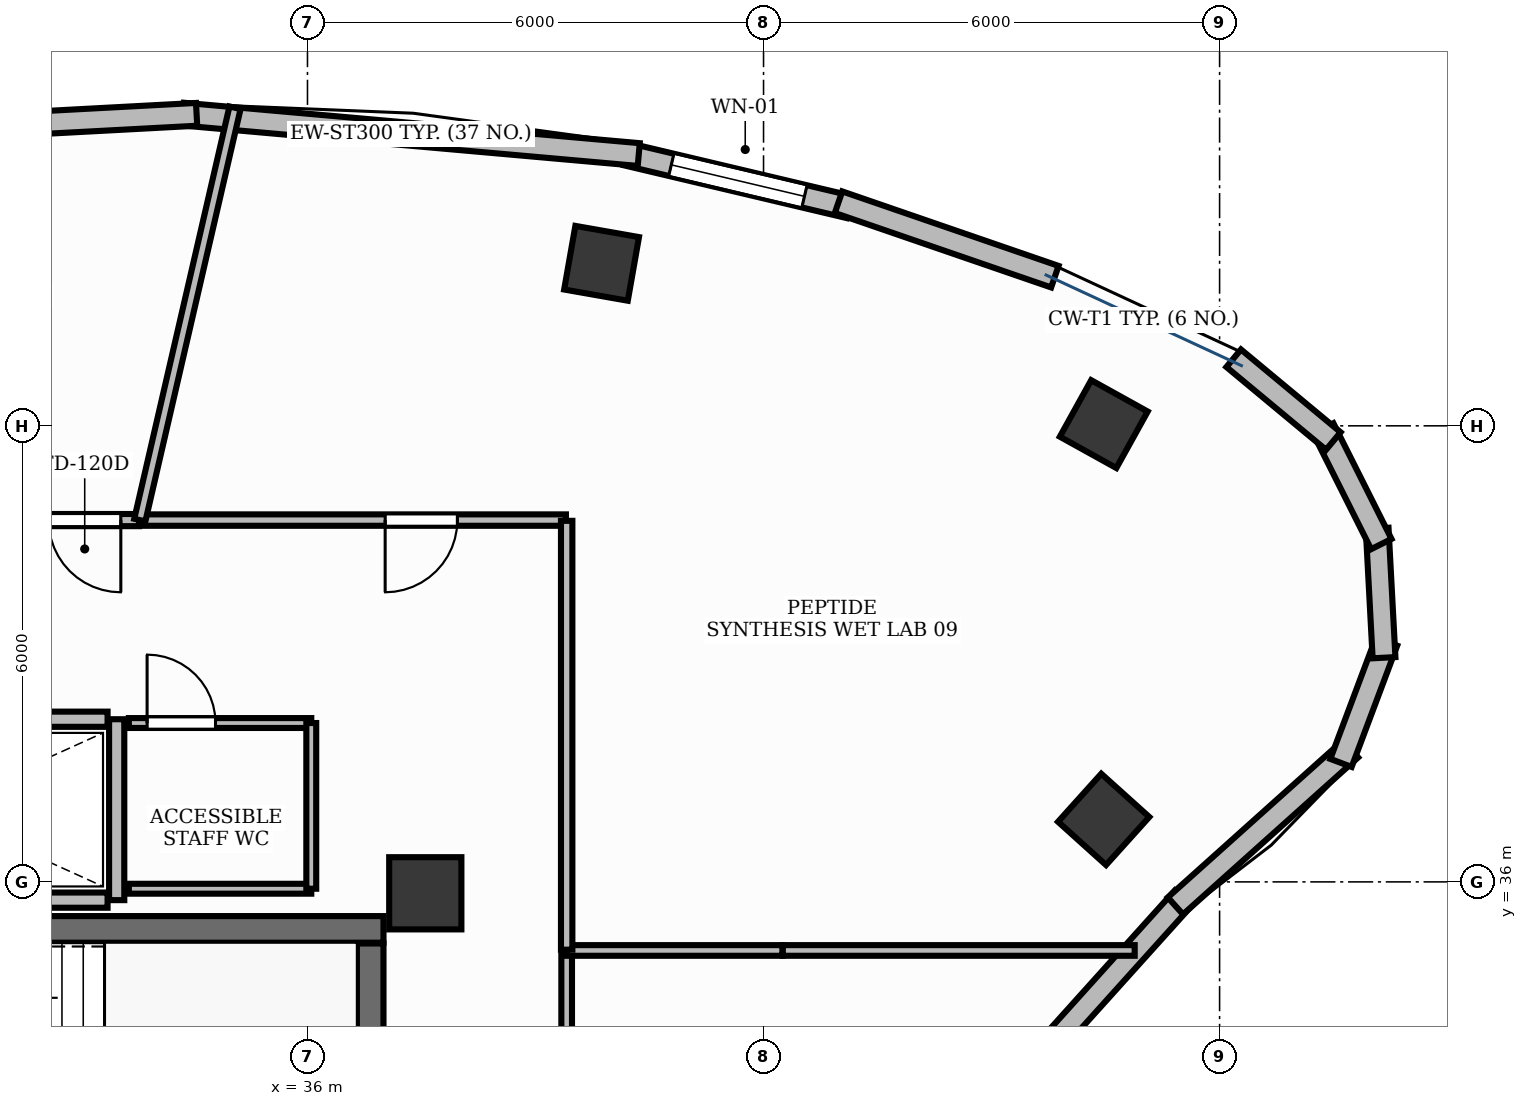
"""IFC4 building model, lengths in metres.
Left out: names, types, materials, properties, quantities, classifications, styles, units other than length and angle.
Written with IfcOpenShell. Run it as: python <this file> out.ifc"""

import sys

from ifc_helpers import new_model, si_unit, direction, frame, frame_2d, origin, origin_2d, place, context, subcontext, project, spatial, rectangle, extrude, element, fill, save


model = new_model("IFC4")
c1 = context("Model", 3, precision=1e-05, world=origin(), true_north=direction((0.0, 1.0)))
c2 = subcontext(c1, "Body", "Model", "MODEL_VIEW")
j1 = project(units=[si_unit("LENGTHUNIT", "METRE"), si_unit("PLANEANGLEUNIT", "RADIAN")], contexts=[c1])
p1 = place(None, origin())
s1 = spatial("IfcSite", under=j1, at=p1, CompositionType="ELEMENT")
p2 = place(p1, origin())
s2 = spatial("IfcBuilding", under=s1, at=p2, CompositionType="ELEMENT")
p3 = place(p2, frame((0.0, 0.0, 282.6)))
s3 = spatial("IfcBuildingStorey", under=s2, at=p3, CompositionType="ELEMENT", Elevation=282.6)
p4 = place(p3, frame((28.852, 35.375, 0.0), z_axis=(0.0, 0.0, 1.0), x_axis=(1.0, 0.0, 0.0)))
e1 = element("IfcWall", 1, at=p4, inside=s3, PredefinedType="SHEAR", context=c2, shape_type="SweptSolid", body=[
    extrude(rectangle(XDim=8.148, YDim=0.35, at=frame_2d((4.074, 0.0))), origin(), (0.0, 0.0, 1.0), 3.79),
])
p5 = place(p3, frame((36.825, 32.11, 0.0), z_axis=(0.0, 0.0, 1.0), x_axis=(0.0, 1.0, 0.0)))
e2 = element("IfcWall", 2, at=p5, inside=s3, PredefinedType="SHEAR", context=c2, shape_type="SweptSolid", body=[
    extrude(rectangle(XDim=3.08, YDim=0.35, at=frame_2d((1.54, 0.0))), origin(), (0.0, 0.0, 1.0), 3.79),
])
p6 = place(p3, frame((37.55, 35.85, -0.0), z_axis=(0.0, 0.0, 1.0), x_axis=(1.0, 0.0, 0.0)))
e3 = element("IfcColumn", 3, at=p6, inside=s3, PredefinedType="PILASTER", context=c2, shape_type="SweptSolid", body=[
    extrude(rectangle(XDim=0.95, YDim=0.95, at=origin_2d()), origin(), (0.0, 0.0, 1.0), 3.791),
])
for number, where, z_axis, x_axis in (
    (4, (46.476, 42.023, -0.0), (0.0, 0.0, 1.0), (-0.875, 0.485, 0.0)),
    (5, (39.869, 44.138, -0.0), (0.0, 0.0, 1.0), (-0.985, 0.173, 0.0)),
    (6, (46.475, 36.823, -0.0), (0.0, 0.0, 1.0), (0.669, 0.743, 0.0)),
):
    element("IfcColumn", number, at=place(p3, frame(where, z_axis=z_axis, x_axis=x_axis)), inside=s3, PredefinedType="COLUMN", context=c2, shape_type="SweptSolid", body=[
        extrude(rectangle(XDim=0.85, YDim=0.85, at=origin_2d()), origin(), (0.0, 0.0, 1.0), 3.791),
    ])
p7 = place(p3, frame((43.129, 44.879, 0.0), z_axis=(0.0, 0.0, 1.0), x_axis=(-0.9731008332, 0.230379618079, 0.0)))
e7 = element("IfcWall", 7, at=p7, inside=s3, PredefinedType="STANDARD", context=c2, shape_type="SweptSolid", body=[
    extrude(rectangle(XDim=3.015, YDim=0.3, at=frame_2d((1.507, 0.0))), origin(), (0.0, 0.0, 1.0), 3.79),
])
p8 = place(p7, frame((0.607, 0.0, 0.9)))
e8 = element("IfcOpeningElement", 8, at=p8, cuts=e7, PredefinedType="OPENING", context=c2, shape_type="SweptSolid", body=[
    extrude(rectangle(XDim=1.8, YDim=2.1, at=frame_2d((0.9, 1.05))), frame((0.0, 0.165, 0.0), z_axis=(0.0, -1.0, 0.0), x_axis=(1.0, 0.0, 0.0)), (0.0, 0.0, 1.0), 0.33),
])
p9 = place(p3, frame((45.833, 43.962, 0.0), z_axis=(0.0, 0.0, 1.0), x_axis=(-0.945539222934, 0.325508184064, 0.0)))
e9 = element("IfcWall", 9, at=p9, inside=s3, PredefinedType="STANDARD", context=c2, shape_type="SweptSolid", body=[
    extrude(rectangle(XDim=3.01, YDim=0.3, at=frame_2d((1.505, 0.0))), origin(), (0.0, 0.0, 1.0), 3.79),
])
p10 = place(p3, frame((40.358, 45.569, 0.0), z_axis=(0.0, 0.0, 1.0), x_axis=(-0.99608733171, 0.088374360578, 0.0)))
e10 = element("IfcWall", 10, at=p10, inside=s3, PredefinedType="STANDARD", context=c2, shape_type="SweptSolid", body=[
    extrude(rectangle(XDim=6.02, YDim=0.3, at=frame_2d((3.01, 0.0))), origin(), (0.0, 0.0, 1.0), 3.36),
])
p11 = place(p3, frame((34.542, 46.098, 0.0), z_axis=(0.0, 0.0, 1.0), x_axis=(-0.998577283854, -0.053323617382, 0.0)))
e11 = element("IfcWall", 11, at=p11, inside=s3, PredefinedType="STANDARD", context=c2, shape_type="SweptSolid", body=[
    extrude(rectangle(XDim=3.1, YDim=0.3, at=frame_2d((1.55, 0.0))), origin(), (0.0, 0.0, 1.0), 3.36),
])
p12 = place(p3, frame((45.548, 33.596, 0.0), z_axis=(0.0, 0.0, 1.0), x_axis=(0.669166006669, 0.743112949368, 0.0)))
e12 = element("IfcWall", 12, at=p12, inside=s3, PredefinedType="STANDARD", context=c2, shape_type="SweptSolid", body=[
    extrude(rectangle(XDim=2.948, YDim=0.3, at=frame_2d((1.474, 0.0))), origin(), (0.0, 0.0, 1.0), 3.79),
])
p13 = place(p3, frame((47.419, 35.684, 0.0), z_axis=(0.0, 0.0, 1.0), x_axis=(0.744720921046, 0.667376018266, 0.0)))
e13 = element("IfcWall", 13, at=p13, inside=s3, PredefinedType="STANDARD", context=c2, shape_type="SweptSolid", body=[
    extrude(rectangle(XDim=3.094, YDim=0.3, at=frame_2d((1.547, 0.0))), origin(), (0.0, 0.0, 1.0), 3.79),
])
for number, where, z_axis, x_axis in (
    (14, (49.597, 37.565, 0.0), (0.0, 0.0, 1.0), (0.351, 0.936, 0.0)),
    (15, (50.163, 38.949, 0.0), (0.0, 0.0, 1.0), (-0.053, 0.999, 0.0)),
):
    element("IfcWall", number, at=place(p3, frame(where, z_axis=z_axis, x_axis=x_axis)), inside=s3, PredefinedType="STANDARD", context=c2, shape_type="SweptSolid", body=[
        extrude(rectangle(XDim=1.704, YDim=0.3, at=frame_2d((0.852, 0.0))), origin(), (0.0, 0.0, 1.0), 3.79),
    ])
for number, where, z_axis, x_axis in (
    (16, (50.128, 40.445, 0.0), (0.0, 0.0, 1.0), (-0.449, 0.894, 0.0)),
    (17, (49.496, 41.8, 0.0), (0.0, 0.0, 1.0), (-0.769, 0.639, 0.0)),
):
    element("IfcWall", number, at=place(p3, frame(where, z_axis=z_axis, x_axis=x_axis)), inside=s3, PredefinedType="STANDARD", context=c2, shape_type="SweptSolid", body=[
        extrude(rectangle(XDim=1.704, YDim=0.3, at=frame_2d((0.852, 0.0))), origin(), (0.0, 0.0, 1.0), 3.79),
    ])
p14 = place(p3, frame((33.49, 35.76, 0.0), z_axis=(0.0, 0.0, 1.0), x_axis=(0.0, 1.0, 0.0)))
e18 = element("IfcWall", 18, at=p14, inside=s3, PredefinedType="PARTITIONING", context=c2, shape_type="SweptSolid", body=[
    extrude(rectangle(XDim=2.38, YDim=0.2, at=frame_2d((1.19, 0.0))), origin(), (0.0, 0.0, 1.0), 2.8),
])
for number, where, z_axis, x_axis in (
    (19, (28.8, 35.76, 0.0), (0.0, 0.0, 1.0), (1.0, 0.0, 0.0)),
    (20, (28.8, 38.14, 0.0), (0.0, 0.0, 1.0), (1.0, 0.0, 0.0)),
):
    element("IfcWall", number, at=place(p3, frame(where, z_axis=z_axis, x_axis=x_axis)), inside=s3, PredefinedType="PARTITIONING", context=c2, shape_type="SweptSolid", body=[
        extrude(rectangle(XDim=4.57, YDim=0.2, at=frame_2d((2.285, 0.0))), origin(), (0.0, 0.0, 1.0), 2.8),
    ])
p15 = place(p3, frame((33.65, 38.09, 0.0), z_axis=(0.0, 0.0, 1.0), x_axis=(1.0, 0.0, 0.0)))
e21 = element("IfcWall", 21, at=p15, inside=s3, PredefinedType="PARTITIONING", context=c2, shape_type="SweptSolid", body=[
    extrude(rectangle(XDim=2.4, YDim=0.13, at=frame_2d((1.2, 0.0))), origin(), (0.0, 0.0, 1.0), 2.8),
])
p16 = place(p15, frame((0.24, 0.0, 0.0)))
e22 = element("IfcOpeningElement", 22, at=p16, cuts=e21, PredefinedType="OPENING", context=c2, shape_type="SweptSolid", body=[
    extrude(rectangle(XDim=0.9, YDim=2.15, at=frame_2d((0.45, 1.075))), frame((0.0, 0.08, 0.0), z_axis=(0.0, -1.0, 0.0), x_axis=(1.0, 0.0, 0.0)), (0.0, 0.0, 1.0), 0.16),
])
p17 = place(p3, frame((39.41, 25.202, 0.0), z_axis=(0.0, 0.0, 1.0), x_axis=(0.0, 1.0, 0.0)))
e23 = element("IfcWall", 23, at=p17, inside=s3, PredefinedType="PARTITIONING", context=c2, shape_type="SweptSolid", body=[
    extrude(rectangle(XDim=9.896, YDim=0.14, at=frame_2d((4.948, 0.0))), origin(), (0.0, 0.0, 1.0), 2.8),
])
p18 = place(p17, frame((4.928, 0.0, 0.0)))
e24 = element("IfcOpeningElement", 24, at=p18, cuts=e23, PredefinedType="OPENING", context=c2, shape_type="SweptSolid", body=[
    extrude(rectangle(XDim=0.95, YDim=2.15, at=frame_2d((0.475, 1.075))), frame((0.0, 0.085, 0.0), z_axis=(0.0, -1.0, 0.0), x_axis=(1.0, 0.0, 0.0)), (0.0, 0.0, 1.0), 0.17),
])
p19 = place(p3, frame((39.4, 40.76, 0.0), z_axis=(0.0, 0.0, 1.0), x_axis=(-1.0, 0.0, 0.0)))
e25 = element("IfcWall", 25, at=p19, inside=s3, PredefinedType="PARTITIONING", context=c2, shape_type="SweptSolid", body=[
    extrude(rectangle(XDim=5.606, YDim=0.15, at=frame_2d((2.803, 0.0))), origin(), (0.0, 0.0, 1.0), 2.8),
])
p20 = place(p19, frame((1.428, 0.0, 0.0)))
e26 = element("IfcOpeningElement", 26, at=p20, cuts=e25, PredefinedType="OPENING", context=c2, shape_type="SweptSolid", body=[
    extrude(rectangle(XDim=0.95, YDim=2.15, at=frame_2d((0.475, 1.075))), frame((0.0, 0.09, 0.0), z_axis=(0.0, -1.0, 0.0), x_axis=(1.0, 0.0, 0.0)), (0.0, 0.0, 1.0), 0.18),
])
p21 = place(p3, frame((33.784, 40.76, 0.0), z_axis=(0.0, 0.0, 1.0), x_axis=(-1.0, 0.0, 0.0)))
e27 = element("IfcWall", 27, at=p21, inside=s3, PredefinedType="PARTITIONING", context=c2, shape_type="SweptSolid", body=[
    extrude(rectangle(XDim=11.984, YDim=0.16, at=frame_2d((5.992, 0.0))), origin(), (0.0, 0.0, 1.0), 2.8),
])
p22 = place(p21, frame((0.24, 0.0, 0.0)))
e28 = element("IfcOpeningElement", 28, at=p22, cuts=e27, PredefinedType="OPENING", context=c2, shape_type="SweptSolid", body=[
    extrude(rectangle(XDim=0.95, YDim=2.15, at=frame_2d((0.475, 1.075))), frame((0.0, 0.095, 0.0), z_axis=(0.0, -1.0, 0.0), x_axis=(1.0, 0.0, 0.0)), (0.0, 0.0, 1.0), 0.19),
])
p23 = place(p3, frame((36.05, 35.91, 0.0), z_axis=(0.0, 0.0, 1.0), x_axis=(-1.0, 0.0, 0.0)))
e29 = element("IfcWall", 29, at=p23, inside=s3, PredefinedType="PARTITIONING", context=c2, shape_type="SweptSolid", body=[
    extrude(rectangle(XDim=2.4, YDim=0.13, at=frame_2d((1.2, 0.0))), origin(), (0.0, 0.0, 1.0), 2.8),
])
p24 = place(p3, frame((36.05, 38.09, 0.0), z_axis=(0.0, 0.0, 1.0), x_axis=(0.0, -1.0, 0.0)))
e30 = element("IfcWall", 30, at=p24, inside=s3, PredefinedType="PARTITIONING", context=c2, shape_type="SweptSolid", body=[
    extrude(rectangle(XDim=2.18, YDim=0.13, at=frame_2d((1.09, 0.0))), origin(), (0.0, 0.0, 1.0), 2.8),
])
p25 = place(p3, frame((42.252, 35.098, 0.0), z_axis=(0.0, 0.0, 1.0), x_axis=(1.0, 0.0, 0.0)))
e31 = element("IfcWall", 31, at=p25, inside=s3, PredefinedType="PARTITIONING", context=c2, shape_type="SweptSolid", body=[
    extrude(rectangle(XDim=4.631, YDim=0.14, at=frame_2d((2.315, 0.0))), origin(), (0.0, 0.0, 1.0), 2.8),
])
p26 = place(p3, frame((39.41, 35.098, 0.0), z_axis=(0.0, 0.0, 1.0), x_axis=(1.0, 0.0, 0.0)))
e32 = element("IfcWall", 32, at=p26, inside=s3, PredefinedType="PARTITIONING", context=c2, shape_type="SweptSolid", body=[
    extrude(rectangle(XDim=2.838, YDim=0.14, at=frame_2d((1.419, 0.0))), origin(), (0.0, 0.0, 1.0), 2.8),
])
p27 = place(p3, frame((39.41, 35.108, 0.0), z_axis=(0.0, 0.0, 1.0), x_axis=(0.0, 1.0, 0.0)))
e33 = element("IfcWall", 33, at=p27, inside=s3, PredefinedType="PARTITIONING", context=c2, shape_type="SweptSolid", body=[
    extrude(rectangle(XDim=5.642, YDim=0.15, at=frame_2d((2.821, 0.0))), origin(), (0.0, 0.0, 1.0), 2.8),
])
p28 = place(p3, frame((33.794, 40.76, 0.0), z_axis=(0.0, 0.0, 1.0), x_axis=(0.224974808594, 0.974364580379, 0.0)))
e34 = element("IfcWall", 34, at=p28, inside=s3, PredefinedType="PARTITIONING", context=c2, shape_type="SweptSolid", body=[
    extrude(rectangle(XDim=5.567, YDim=0.15, at=frame_2d((2.784, 0.0))), origin(), (0.0, 0.0, 1.0), 2.8),
])
p29 = place(p8, origin())
e35 = element("IfcWindow", 35, at=p29, inside=s3, PartitioningType="SINGLE_PANEL", PredefinedType="WINDOW", context=c2, shape_type="SweptSolid", body=[
    extrude(rectangle(XDim=1.8, YDim=2.1, at=frame_2d((0.9, 1.05))), frame((0.0, 0.03, 0.0), z_axis=(0.0, -1.0, 0.0), x_axis=(1.0, 0.0, 0.0)), (0.0, 0.0, 1.0), 0.06),
])
fill(e8, e35)
p30 = place(p16, origin())
e36 = element("IfcDoor", 36, at=p30, inside=s3, OperationType="SINGLE_SWING_LEFT", PredefinedType="DOOR", context=c2, shape_type="SweptSolid", body=[
    extrude(rectangle(XDim=0.9, YDim=2.15, at=frame_2d((0.45, 1.075))), frame((0.0, 0.025, 0.0), z_axis=(0.0, -1.0, 0.0), x_axis=(1.0, 0.0, 0.0)), (0.0, 0.0, 1.0), 0.05),
])
fill(e22, e36)
p31 = place(p20, origin())
e37 = element("IfcDoor", 37, at=p31, inside=s3, OperationType="SINGLE_SWING_RIGHT", PredefinedType="DOOR", context=c2, shape_type="SweptSolid", body=[
    extrude(rectangle(XDim=0.95, YDim=2.15, at=frame_2d((0.475, 1.075))), frame((0.0, 0.025, 0.0), z_axis=(0.0, -1.0, 0.0), x_axis=(1.0, 0.0, 0.0)), (0.0, 0.0, 1.0), 0.05),
])
fill(e26, e37)
p32 = place(p22, origin())
e38 = element("IfcDoor", 38, at=p32, inside=s3, OperationType="SINGLE_SWING_LEFT", PredefinedType="DOOR", context=c2, shape_type="SweptSolid", body=[
    extrude(rectangle(XDim=0.95, YDim=2.15, at=frame_2d((0.475, 1.075))), frame((0.0, 0.025, 0.0), z_axis=(0.0, -1.0, 0.0), x_axis=(1.0, 0.0, 0.0)), (0.0, 0.0, 1.0), 0.05),
])
fill(e28, e38)
save(model, sys.argv[1])
